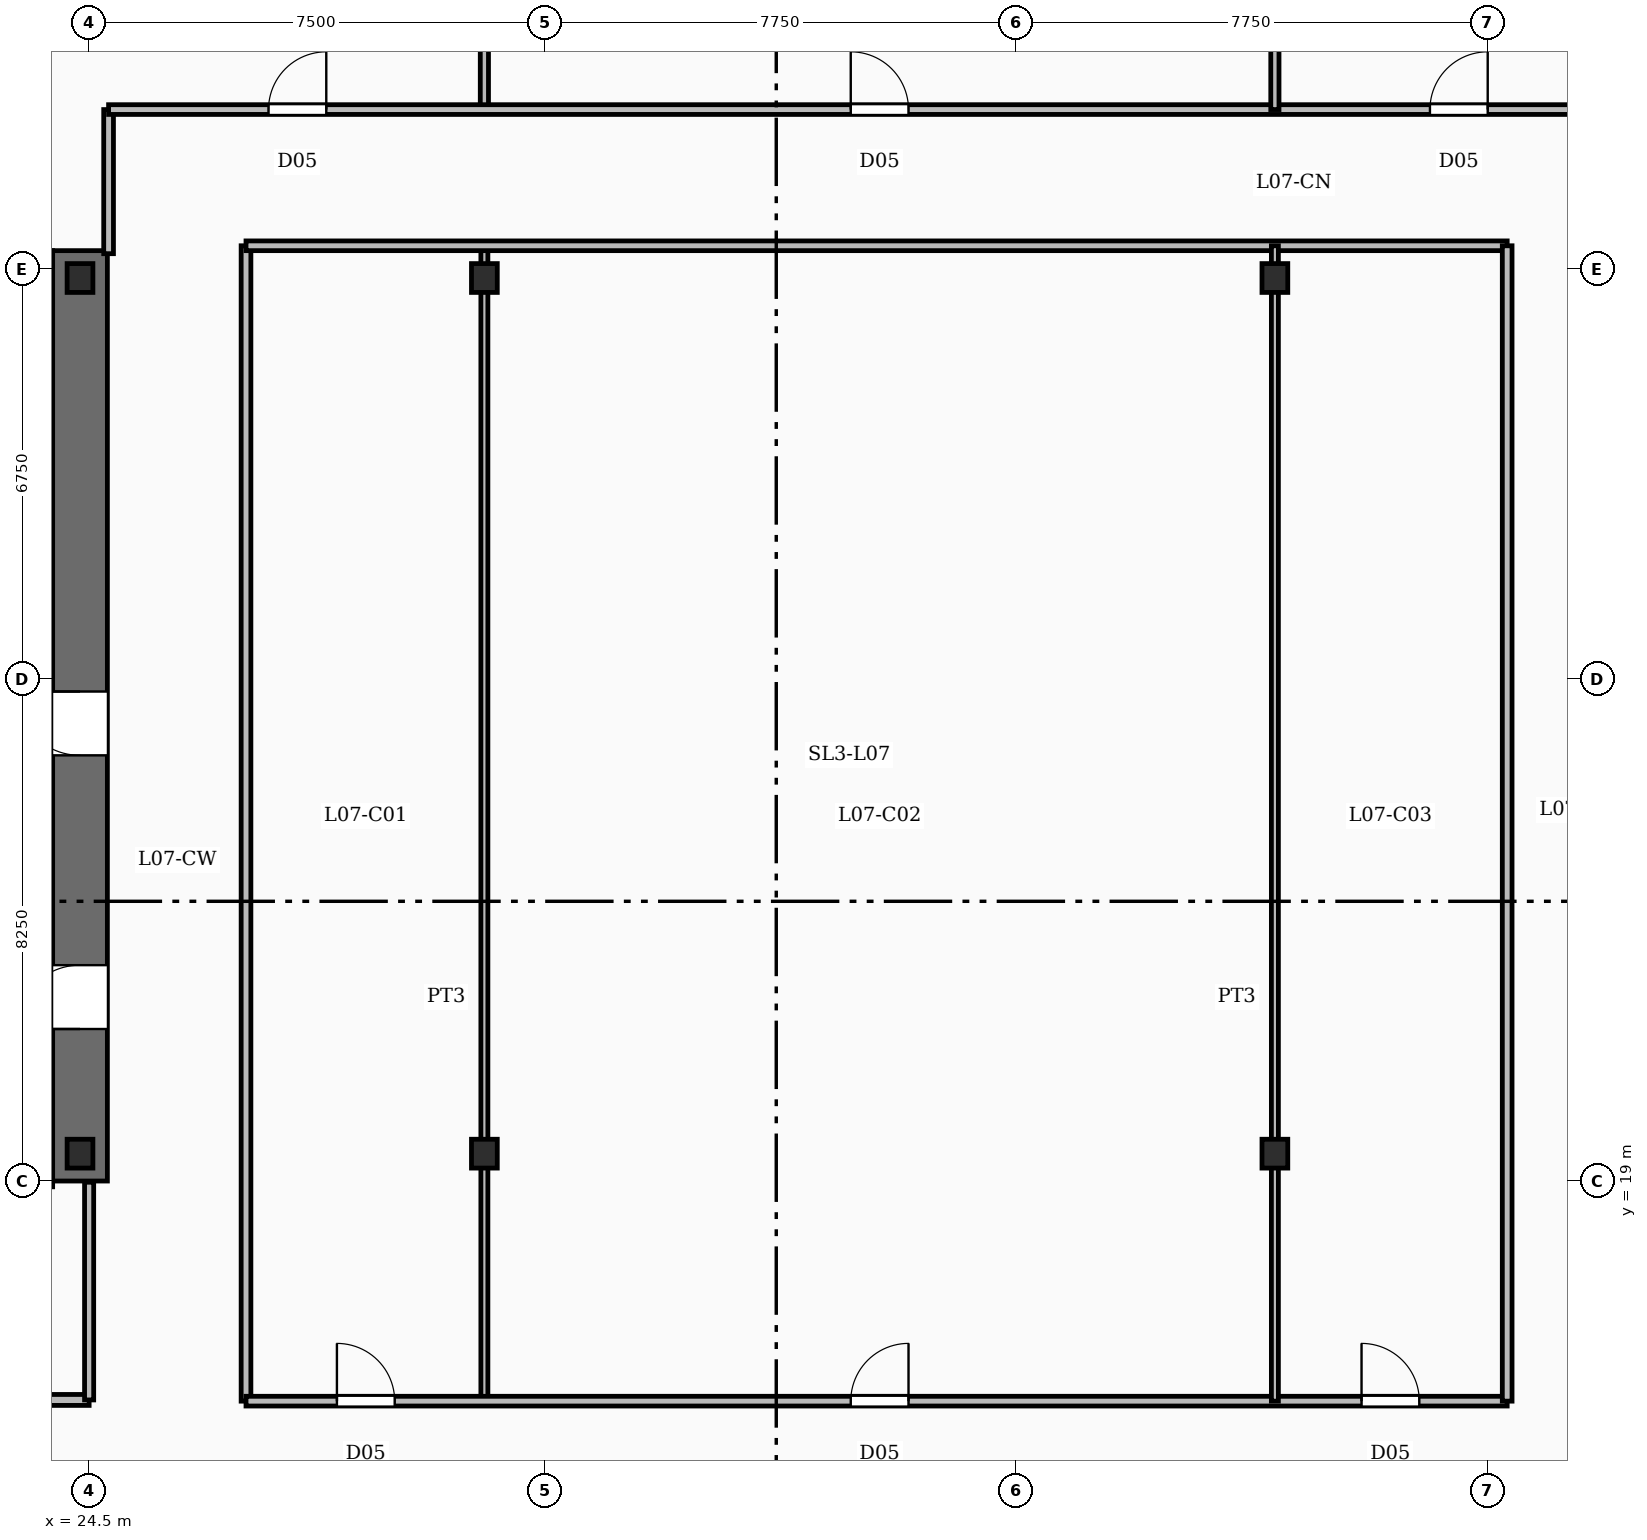
"""IFC4 building model, lengths in metres.
Left out: names, types, materials, properties, quantities, classifications, styles, units other than length and angle.
Written with IfcOpenShell. Run it as: python <this file> out.ifc"""

import sys

from ifc_helpers import new_model, si_unit, direction, frame, frame_2d, origin, origin_2d, place, context, subcontext, project, spatial, rectangle, i_section, extrude, element, fill, save


model = new_model("IFC4")
c1 = context("Model", 3, precision=1e-05, world=origin(), true_north=direction((0.0, 1.0)))
c2 = subcontext(c1, "Body", "Model", "MODEL_VIEW")
j1 = project(units=[si_unit("LENGTHUNIT", "METRE"), si_unit("PLANEANGLEUNIT", "RADIAN")], contexts=[c1])
p1 = place(None, origin())
s1 = spatial("IfcSite", under=j1, at=p1, CompositionType="ELEMENT")
p2 = place(p1, origin())
s2 = spatial("IfcBuilding", under=s1, at=p2, CompositionType="ELEMENT")
p3 = place(p2, frame((0.0, 0.0, 42.0)))
s3 = spatial("IfcBuildingStorey", under=s2, at=p3, CompositionType="ELEMENT", Elevation=42.0)
p4 = place(p3, frame((24.35, 19.0, -0.45), z_axis=(0.0, 0.0, 1.0), x_axis=(0.0, 1.0, 0.0)))
e1 = element("IfcWall", 1, at=p4, inside=s3, PredefinedType="SHEAR", context=c2, shape_type="SweptSolid", body=[
    extrude(rectangle(XDim=15.3, YDim=0.9, at=frame_2d((7.65, 0.0))), origin(), (0.0, 0.0, 1.0), 3.93),
])
p5 = place(p4, frame((2.5, 0.0, 0.45)))
e2 = element("IfcOpeningElement", 2, at=p5, cuts=e1, PredefinedType="OPENING", context=c2, shape_type="SweptSolid", body=[
    extrude(rectangle(XDim=1.05, YDim=2.15, at=frame_2d((0.525, 1.075))), frame((0.0, 0.46, 0.0), z_axis=(0.0, -1.0, 0.0), x_axis=(1.0, 0.0, 0.0)), (0.0, 0.0, 1.0), 0.92),
])
p6 = place(p4, frame((7.0, 0.0, 0.45)))
e3 = element("IfcOpeningElement", 3, at=p6, cuts=e1, PredefinedType="OPENING", context=c2, shape_type="SweptSolid", body=[
    extrude(rectangle(XDim=1.05, YDim=2.15, at=frame_2d((0.525, 1.075))), frame((0.0, 0.46, 0.0), z_axis=(0.0, -1.0, 0.0), x_axis=(1.0, 0.0, 0.0)), (0.0, 0.0, 1.0), 0.92),
])
for number, where, z_axis, x_axis in (
    (4, (15.0, 19.45, -0.45), (0.0, 0.0, 1.0), (1.0, 0.0, 0.0)),
    (5, (15.0, 33.85, -0.45), (0.0, 0.0, 1.0), (1.0, 0.0, 0.0)),
):
    element("IfcWall", number, at=place(p3, frame(where, z_axis=z_axis, x_axis=x_axis)), inside=s3, PredefinedType="SHEAR", context=c2, shape_type="SweptSolid", body=[
        extrude(rectangle(XDim=8.9, YDim=0.9, at=frame_2d((4.45, 0.0))), origin(), (0.0, 0.0, 1.0), 3.93),
    ])
for number, where, z_axis, x_axis in (
    (6, (24.35, 19.45, -0.45), (0.0, 0.0, 1.0), (1.0, 0.0, 0.0)),
    (7, (24.35, 33.85, -0.45), (0.0, 0.0, 1.0), (1.0, 0.0, 0.0)),
    (8, (31.0, 19.45, -0.45), (0.0, 0.0, 1.0), (1.0, 0.0, 0.0)),
    (9, (44.0, 19.45, -0.45), (0.0, 0.0, 1.0), (1.0, 0.0, 0.0)),
    (10, (31.0, 33.85, -0.45), (0.0, 0.0, 1.0), (1.0, 0.0, 0.0)),
    (11, (44.0, 33.85, -0.45), (0.0, 0.0, 1.0), (1.0, 0.0, 0.0)),
):
    element("IfcColumn", number, at=place(p3, frame(where, z_axis=z_axis, x_axis=x_axis)), inside=s3, PredefinedType="COLUMN", context=c2, shape_type="SweptSolid", body=[
        extrude(i_section(OverallWidth=0.424, OverallDepth=0.474, WebThickness=0.048, FlangeThickness=0.077, FilletRadius=0.02, at=origin_2d()), origin(), (0.0, 0.0, 1.0), 3.93),
    ])
p7 = place(p3, frame((23.9, 28.78, 0.0), z_axis=(0.0, 0.0, 1.0), x_axis=(-1.0, 0.0, 0.0)))
e12 = element("IfcWall", 12, at=p7, inside=s3, PredefinedType="SOLIDWALL", context=c2, shape_type="SweptSolid", body=[
    extrude(rectangle(XDim=8.9, YDim=0.24, at=frame_2d((4.45, 0.0))), origin(), (0.0, 0.0, 1.0), 3.48),
])
p8 = place(p7, frame((7.38, 0.0, 0.0)))
e13 = element("IfcOpeningElement", 13, at=p8, cuts=e12, PredefinedType="OPENING", context=c2, shape_type="SweptSolid", body=[
    extrude(rectangle(XDim=1.1, YDim=2.15, at=frame_2d((0.55, 1.075))), frame((0.0, 0.13, 0.0), z_axis=(0.0, -1.0, 0.0), x_axis=(1.0, 0.0, 0.0)), (0.0, 0.0, 1.0), 0.26),
])
p9 = place(p3, frame((15.0, 32.25, 0.0), z_axis=(0.0, 0.0, 1.0), x_axis=(1.0, 0.0, 0.0)))
e14 = element("IfcWall", 14, at=p9, inside=s3, PredefinedType="SOLIDWALL", context=c2, shape_type="SweptSolid", body=[
    extrude(rectangle(XDim=8.9, YDim=0.24, at=frame_2d((4.45, 0.0))), origin(), (0.0, 0.0, 1.0), 3.48),
])
p10 = place(p3, frame((23.78, 28.9, 0.0), z_axis=(0.0, 0.0, 1.0), x_axis=(0.0, 1.0, 0.0)))
e15 = element("IfcWall", 15, at=p10, inside=s3, PredefinedType="SOLIDWALL", context=c2, shape_type="SweptSolid", body=[
    extrude(rectangle(XDim=3.23, YDim=0.24, at=frame_2d((1.615, 0.0))), origin(), (0.0, 0.0, 1.0), 3.48),
])
for number, where, z_axis, x_axis in (
    (16, (20.9, 20.905, 0.0), (0.0, 0.0, 1.0), (1.0, 0.0, 0.0)),
    (17, (20.9, 18.995, 0.0), (0.0, 0.0, 1.0), (1.0, 0.0, 0.0)),
):
    element("IfcWall", number, at=place(p3, frame(where, z_axis=z_axis, x_axis=x_axis)), inside=s3, PredefinedType="SOLIDWALL", context=c2, shape_type="SweptSolid", body=[
        extrude(rectangle(XDim=3.0, YDim=0.18, at=frame_2d((1.5, 0.0))), origin(), (0.0, 0.0, 1.0), 3.48),
    ])
for number, where, z_axis, x_axis in (
    (18, (20.95, 25.155, 0.0), (0.0, 0.0, 1.0), (1.0, 0.0, 0.0)),
    (19, (20.95, 23.045, 0.0), (0.0, 0.0, 1.0), (1.0, 0.0, 0.0)),
):
    element("IfcWall", number, at=place(p3, frame(where, z_axis=z_axis, x_axis=x_axis)), inside=s3, PredefinedType="SOLIDWALL", context=c2, shape_type="SweptSolid", body=[
        extrude(rectangle(XDim=2.95, YDim=0.18, at=frame_2d((1.475, 0.0))), origin(), (0.0, 0.0, 1.0), 3.48),
    ])
p11 = place(p3, frame((14.6, 15.4, 0.0), z_axis=(0.0, 0.0, 1.0), x_axis=(1.0, 0.0, 0.0)))
e20 = element("IfcWall", 20, at=p11, inside=s3, PredefinedType="PARTITIONING", context=c2, shape_type="SweptSolid", body=[
    extrude(rectangle(XDim=9.9, YDim=0.18, at=frame_2d((4.95, 0.0))), origin(), (0.0, 0.0, 1.0), 2.54),
])
p12 = place(p11, frame((0.74, 0.0, 0.0)))
e21 = element("IfcOpeningElement", 21, at=p12, cuts=e20, PredefinedType="OPENING", context=c2, shape_type="SweptSolid", body=[
    extrude(rectangle(XDim=0.92, YDim=2.1, at=frame_2d((0.46, 1.05))), frame((0.0, 0.1, 0.0), z_axis=(0.0, -1.0, 0.0), x_axis=(1.0, 0.0, 0.0)), (0.0, 0.0, 1.0), 0.2),
])
p13 = place(p11, frame((3.19, 0.0, 0.0)))
e22 = element("IfcOpeningElement", 22, at=p13, cuts=e20, PredefinedType="OPENING", context=c2, shape_type="SweptSolid", body=[
    extrude(rectangle(XDim=0.92, YDim=2.1, at=frame_2d((0.46, 1.05))), frame((0.0, 0.1, 0.0), z_axis=(0.0, -1.0, 0.0), x_axis=(1.0, 0.0, 0.0)), (0.0, 0.0, 1.0), 0.2),
])
p14 = place(p11, frame((5.69, 0.0, 0.0)))
e23 = element("IfcOpeningElement", 23, at=p14, cuts=e20, PredefinedType="OPENING", context=c2, shape_type="SweptSolid", body=[
    extrude(rectangle(XDim=0.92, YDim=2.1, at=frame_2d((0.46, 1.05))), frame((0.0, 0.1, 0.0), z_axis=(0.0, -1.0, 0.0), x_axis=(1.0, 0.0, 0.0)), (0.0, 0.0, 1.0), 0.2),
])
p15 = place(p11, frame((8.19, 0.0, 0.0)))
e24 = element("IfcOpeningElement", 24, at=p15, cuts=e20, PredefinedType="OPENING", context=c2, shape_type="SweptSolid", body=[
    extrude(rectangle(XDim=0.92, YDim=2.1, at=frame_2d((0.46, 1.05))), frame((0.0, 0.1, 0.0), z_axis=(0.0, -1.0, 0.0), x_axis=(1.0, 0.0, 0.0)), (0.0, 0.0, 1.0), 0.2),
])
p16 = place(p3, frame((24.5, 15.4, 0.0), z_axis=(0.0, 0.0, 1.0), x_axis=(0.0, 1.0, 0.0)))
e25 = element("IfcWall", 25, at=p16, inside=s3, PredefinedType="PARTITIONING", context=c2, shape_type="SweptSolid", body=[
    extrude(rectangle(XDim=3.58, YDim=0.15, at=frame_2d((1.79, 0.0))), origin(), (0.0, 0.0, 1.0), 2.54),
])
for number, where, z_axis, x_axis in (
    (26, (31.0, 36.62, 0.0), (0.0, 0.0, 1.0), (0.0, 1.0, 0.0)),
    (27, (44.0, 36.62, 0.0), (0.0, 0.0, 1.0), (0.0, 1.0, 0.0)),
):
    element("IfcWall", number, at=place(p3, frame(where, z_axis=z_axis, x_axis=x_axis)), inside=s3, PredefinedType="PARTITIONING", context=c2, shape_type="SweptSolid", body=[
        extrude(rectangle(XDim=12.88, YDim=0.135, at=frame_2d((6.44, 0.0))), origin(), (0.0, 0.0, 1.0), 2.54),
    ])
p17 = place(p3, frame((24.82, 34.25, 0.0), z_axis=(0.0, 0.0, 1.0), x_axis=(0.0, 1.0, 0.0)))
e28 = element("IfcWall", 28, at=p17, inside=s3, PredefinedType="PARTITIONING", context=c2, shape_type="SweptSolid", body=[
    extrude(rectangle(XDim=2.37, YDim=0.16, at=frame_2d((1.185, 0.0))), origin(), (0.0, 0.0, 1.0), 2.54),
])
p18 = place(p3, frame((24.82, 36.62, 0.0), z_axis=(0.0, 0.0, 1.0), x_axis=(1.0, 0.0, 0.0)))
e29 = element("IfcWall", 29, at=p18, inside=s3, PredefinedType="PARTITIONING", context=c2, shape_type="SweptSolid", body=[
    extrude(rectangle(XDim=25.26, YDim=0.16, at=frame_2d((12.63, 0.0))), origin(), (0.0, 0.0, 1.0), 2.54),
])
p19 = place(p18, frame((2.63, 0.0, 0.0)))
e30 = element("IfcOpeningElement", 30, at=p19, cuts=e29, PredefinedType="OPENING", context=c2, shape_type="SweptSolid", body=[
    extrude(rectangle(XDim=0.95, YDim=2.15, at=frame_2d((0.475, 1.075))), frame((0.0, 0.09, 0.0), z_axis=(0.0, -1.0, 0.0), x_axis=(1.0, 0.0, 0.0)), (0.0, 0.0, 1.0), 0.18),
])
p20 = place(p18, frame((12.205, 0.0, 0.0)))
e31 = element("IfcOpeningElement", 31, at=p20, cuts=e29, PredefinedType="OPENING", context=c2, shape_type="SweptSolid", body=[
    extrude(rectangle(XDim=0.95, YDim=2.15, at=frame_2d((0.475, 1.075))), frame((0.0, 0.09, 0.0), z_axis=(0.0, -1.0, 0.0), x_axis=(1.0, 0.0, 0.0)), (0.0, 0.0, 1.0), 0.18),
])
p21 = place(p18, frame((21.73, 0.0, 0.0)))
e32 = element("IfcOpeningElement", 32, at=p21, cuts=e29, PredefinedType="OPENING", context=c2, shape_type="SweptSolid", body=[
    extrude(rectangle(XDim=0.95, YDim=2.15, at=frame_2d((0.475, 1.075))), frame((0.0, 0.09, 0.0), z_axis=(0.0, -1.0, 0.0), x_axis=(1.0, 0.0, 0.0)), (0.0, 0.0, 1.0), 0.18),
])
for number, where, z_axis, x_axis in (
    (33, (31.0, 15.38, 0.0), (0.0, 0.0, 1.0), (0.0, 1.0, 0.0)),
    (34, (44.0, 15.38, 0.0), (0.0, 0.0, 1.0), (0.0, 1.0, 0.0)),
):
    element("IfcWall", number, at=place(p3, frame(where, z_axis=z_axis, x_axis=x_axis)), inside=s3, PredefinedType="PARTITIONING", context=c2, shape_type="SweptSolid", body=[
        extrude(rectangle(XDim=19.0, YDim=0.115, at=frame_2d((9.5, 0.0))), origin(), (0.0, 0.0, 1.0), 2.54),
    ])
p22 = place(p3, frame((27.08, 15.38, 0.0), z_axis=(0.0, 0.0, 1.0), x_axis=(1.0, 0.0, 0.0)))
e35 = element("IfcWall", 35, at=p22, inside=s3, PredefinedType="PARTITIONING", context=c2, shape_type="SweptSolid", body=[
    extrude(rectangle(XDim=20.74, YDim=0.16, at=frame_2d((10.37, 0.0))), origin(), (0.0, 0.0, 1.0), 2.54),
])
p23 = place(p22, frame((1.495, 0.0, 0.0)))
e36 = element("IfcOpeningElement", 36, at=p23, cuts=e35, PredefinedType="OPENING", context=c2, shape_type="SweptSolid", body=[
    extrude(rectangle(XDim=0.95, YDim=2.15, at=frame_2d((0.475, 1.075))), frame((0.0, 0.09, 0.0), z_axis=(0.0, -1.0, 0.0), x_axis=(1.0, 0.0, 0.0)), (0.0, 0.0, 1.0), 0.18),
])
p24 = place(p22, frame((9.945, 0.0, 0.0)))
e37 = element("IfcOpeningElement", 37, at=p24, cuts=e35, PredefinedType="OPENING", context=c2, shape_type="SweptSolid", body=[
    extrude(rectangle(XDim=0.95, YDim=2.15, at=frame_2d((0.475, 1.075))), frame((0.0, 0.09, 0.0), z_axis=(0.0, -1.0, 0.0), x_axis=(1.0, 0.0, 0.0)), (0.0, 0.0, 1.0), 0.18),
])
p25 = place(p22, frame((18.345, 0.0, 0.0)))
e38 = element("IfcOpeningElement", 38, at=p25, cuts=e35, PredefinedType="OPENING", context=c2, shape_type="SweptSolid", body=[
    extrude(rectangle(XDim=0.95, YDim=2.15, at=frame_2d((0.475, 1.075))), frame((0.0, 0.09, 0.0), z_axis=(0.0, -1.0, 0.0), x_axis=(1.0, 0.0, 0.0)), (0.0, 0.0, 1.0), 0.18),
])
p26 = place(p3, frame((27.08, 34.38, 0.0), z_axis=(0.0, 0.0, 1.0), x_axis=(1.0, 0.0, 0.0)))
e39 = element("IfcWall", 39, at=p26, inside=s3, PredefinedType="PARTITIONING", context=c2, shape_type="SweptSolid", body=[
    extrude(rectangle(XDim=20.74, YDim=0.16, at=frame_2d((10.37, 0.0))), origin(), (0.0, 0.0, 1.0), 2.54),
])
for number, where, z_axis, x_axis in (
    (40, (27.08, 15.38, 0.0), (0.0, 0.0, 1.0), (0.0, 1.0, 0.0)),
    (41, (47.82, 15.38, 0.0), (0.0, 0.0, 1.0), (0.0, 1.0, 0.0)),
):
    element("IfcWall", number, at=place(p3, frame(where, z_axis=z_axis, x_axis=x_axis)), inside=s3, PredefinedType="PARTITIONING", context=c2, shape_type="SweptSolid", body=[
        extrude(rectangle(XDim=19.0, YDim=0.16, at=frame_2d((9.5, 0.0))), origin(), (0.0, 0.0, 1.0), 2.54),
    ])
p27 = place(p5, origin())
e42 = element("IfcDoor", 42, at=p27, inside=s3, OperationType="SINGLE_SWING_LEFT", PredefinedType="DOOR", context=c2, shape_type="SweptSolid", body=[
    extrude(rectangle(XDim=1.05, YDim=2.15, at=frame_2d((0.525, 1.075))), frame((0.0, 0.025, 0.0), z_axis=(0.0, -1.0, 0.0), x_axis=(1.0, 0.0, 0.0)), (0.0, 0.0, 1.0), 0.05),
])
fill(e2, e42)
p28 = place(p6, origin())
e43 = element("IfcDoor", 43, at=p28, inside=s3, OperationType="SINGLE_SWING_RIGHT", PredefinedType="DOOR", context=c2, shape_type="SweptSolid", body=[
    extrude(rectangle(XDim=1.05, YDim=2.15, at=frame_2d((0.525, 1.075))), frame((0.0, 0.025, 0.0), z_axis=(0.0, -1.0, 0.0), x_axis=(1.0, 0.0, 0.0)), (0.0, 0.0, 1.0), 0.05),
])
fill(e3, e43)
p29 = place(p19, origin())
e44 = element("IfcDoor", 44, at=p29, inside=s3, OperationType="SINGLE_SWING_RIGHT", PredefinedType="DOOR", context=c2, shape_type="SweptSolid", body=[
    extrude(rectangle(XDim=0.95, YDim=2.15, at=frame_2d((0.475, 1.075))), frame((0.0, 0.025, 0.0), z_axis=(0.0, -1.0, 0.0), x_axis=(1.0, 0.0, 0.0)), (0.0, 0.0, 1.0), 0.05),
])
fill(e30, e44)
p30 = place(p20, origin())
e45 = element("IfcDoor", 45, at=p30, inside=s3, OperationType="SINGLE_SWING_LEFT", PredefinedType="DOOR", context=c2, shape_type="SweptSolid", body=[
    extrude(rectangle(XDim=0.95, YDim=2.15, at=frame_2d((0.475, 1.075))), frame((0.0, 0.025, 0.0), z_axis=(0.0, -1.0, 0.0), x_axis=(1.0, 0.0, 0.0)), (0.0, 0.0, 1.0), 0.05),
])
fill(e31, e45)
p31 = place(p21, origin())
e46 = element("IfcDoor", 46, at=p31, inside=s3, OperationType="SINGLE_SWING_RIGHT", PredefinedType="DOOR", context=c2, shape_type="SweptSolid", body=[
    extrude(rectangle(XDim=0.95, YDim=2.15, at=frame_2d((0.475, 1.075))), frame((0.0, 0.025, 0.0), z_axis=(0.0, -1.0, 0.0), x_axis=(1.0, 0.0, 0.0)), (0.0, 0.0, 1.0), 0.05),
])
fill(e32, e46)
p32 = place(p23, origin())
e47 = element("IfcDoor", 47, at=p32, inside=s3, OperationType="SINGLE_SWING_LEFT", PredefinedType="DOOR", context=c2, shape_type="SweptSolid", body=[
    extrude(rectangle(XDim=0.95, YDim=2.15, at=frame_2d((0.475, 1.075))), frame((0.0, 0.025, 0.0), z_axis=(0.0, -1.0, 0.0), x_axis=(1.0, 0.0, 0.0)), (0.0, 0.0, 1.0), 0.05),
])
fill(e36, e47)
p33 = place(p24, origin())
e48 = element("IfcDoor", 48, at=p33, inside=s3, OperationType="SINGLE_SWING_RIGHT", PredefinedType="DOOR", context=c2, shape_type="SweptSolid", body=[
    extrude(rectangle(XDim=0.95, YDim=2.15, at=frame_2d((0.475, 1.075))), frame((0.0, 0.025, 0.0), z_axis=(0.0, -1.0, 0.0), x_axis=(1.0, 0.0, 0.0)), (0.0, 0.0, 1.0), 0.05),
])
fill(e37, e48)
p34 = place(p25, origin())
e49 = element("IfcDoor", 49, at=p34, inside=s3, OperationType="SINGLE_SWING_LEFT", PredefinedType="DOOR", context=c2, shape_type="SweptSolid", body=[
    extrude(rectangle(XDim=0.95, YDim=2.15, at=frame_2d((0.475, 1.075))), frame((0.0, 0.025, 0.0), z_axis=(0.0, -1.0, 0.0), x_axis=(1.0, 0.0, 0.0)), (0.0, 0.0, 1.0), 0.05),
])
fill(e38, e49)
save(model, sys.argv[1])
